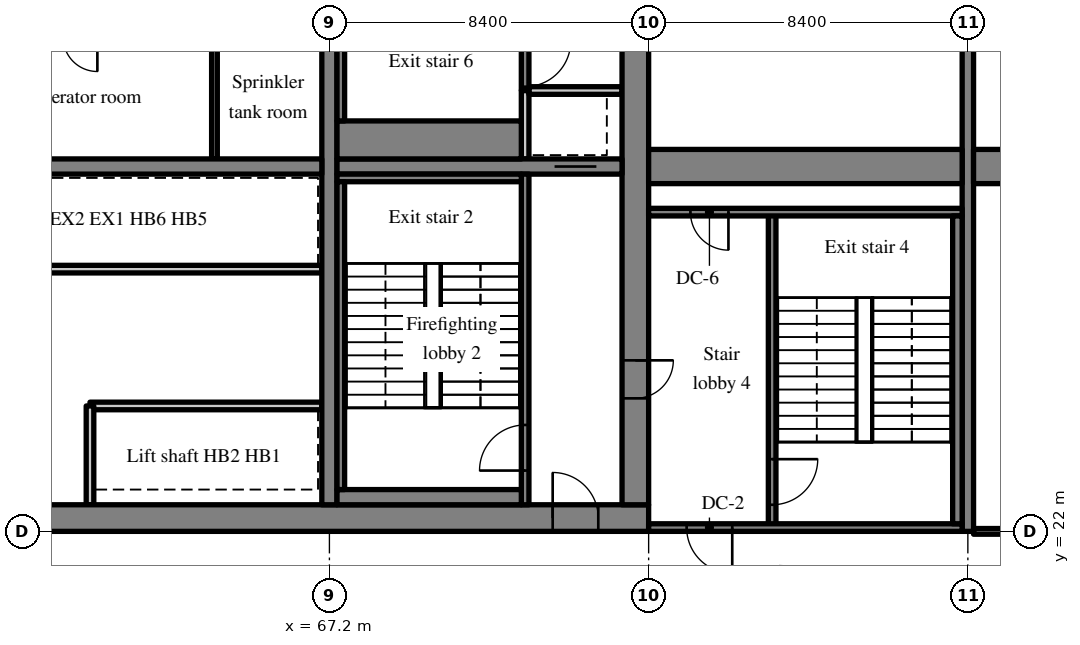
"""IFC4 building model, lengths in metres.
Left out: names, types, materials, properties, quantities, classifications, styles, units other than length and angle.
Written with IfcOpenShell. Run it as: python <this file> out.ifc"""

import sys

from ifc_helpers import new_model, si_unit, direction, frame, frame_2d, origin, place, context, subcontext, project, spatial, rectangle, extrude, source, transform, mapped, element, fill, save


model = new_model("IFC4")
c1 = context("Model", 3, precision=1e-05, world=origin(), true_north=direction((0.0, 1.0)))
c2 = subcontext(c1, "Body", "Model", "MODEL_VIEW")
j1 = project(units=[si_unit("LENGTHUNIT", "METRE"), si_unit("PLANEANGLEUNIT", "RADIAN")], contexts=[c1])
p1 = place(None, origin())
s1 = spatial("IfcSite", under=j1, at=p1, CompositionType="ELEMENT")
p2 = place(p1, origin())
s2 = spatial("IfcBuilding", under=s1, at=p2, CompositionType="ELEMENT")
p3 = place(p2, frame((0.0, 0.0, 201.0)))
s3 = spatial("IfcBuildingStorey", under=s2, at=p3, CompositionType="ELEMENT", Elevation=201.0)
m1 = source(origin(), c2, "Body", "SweptSolid", [
    extrude(rectangle(XDim=50.4, YDim=0.7, at=frame_2d((25.2, 0.0))), origin(), (0.0, 0.0, 1.0), 5.12),
])
p4 = place(p3, frame((25.2, 22.35, 0.0), z_axis=(0.0, 0.0, 1.0), x_axis=(1.0, 0.0, 0.0)))
e1 = element("IfcWall", 1, at=p4, inside=s3, PredefinedType="SHEAR", context=c2, shape_type="MappedRepresentation", body=[
    mapped(m1, transform((0.0, 0.0, 0.0), scale=1.0)),
])
m2 = source(origin(), c2, "Body", "SweptSolid", [
    extrude(rectangle(XDim=1.2, YDim=2.1, at=frame_2d((0.6, 1.05))), frame((0.0, 0.36, 0.0), z_axis=(0.0, -1.0, 0.0), x_axis=(1.0, 0.0, 0.0)), (0.0, 0.0, 1.0), 0.72),
])
p5 = place(p4, frame((22.25, 0.0, 0.0)))
e2 = element("IfcOpeningElement", 2, at=p5, cuts=e1, PredefinedType="OPENING", context=c2, shape_type="MappedRepresentation", body=[
    mapped(m2, transform((0.0, 0.0, 0.0), scale=1.0)),
])
m3 = source(origin(), c2, "Body", "SweptSolid", [
    extrude(rectangle(XDim=0.9, YDim=2.1, at=frame_2d((0.45, 1.05))), frame((0.0, 0.36, 0.0), z_axis=(0.0, -1.0, 0.0), x_axis=(1.0, 0.0, 0.0)), (0.0, 0.0, 1.0), 0.72),
])
p6 = place(p4, frame((15.75, 0.0, 0.0)))
e3 = element("IfcOpeningElement", 3, at=p6, cuts=e1, PredefinedType="OPENING", context=c2, shape_type="MappedRepresentation", body=[
    mapped(m3, transform((0.0, 0.0, 0.0), scale=1.0)),
])
p7 = place(p4, frame((18.75, 0.0, 0.0)))
e4 = element("IfcOpeningElement", 4, at=p7, cuts=e1, PredefinedType="OPENING", context=c2, shape_type="MappedRepresentation", body=[
    mapped(m3, transform((0.0, 0.0, 0.0), scale=1.0)),
])
p8 = place(p4, frame((11.2, 0.0, 0.0)))
e5 = element("IfcOpeningElement", 5, at=p8, cuts=e1, PredefinedType="OPENING", context=c2, shape_type="MappedRepresentation", body=[
    mapped(m3, transform((0.0, 0.0, 0.0), scale=1.0)),
])
m4 = source(origin(), c2, "Body", "SweptSolid", [
    extrude(rectangle(XDim=1.8, YDim=2.1, at=frame_2d((0.9, 1.05))), frame((0.0, 0.36, 0.0), z_axis=(0.0, -1.0, 0.0), x_axis=(1.0, 0.0, 0.0)), (0.0, 0.0, 1.0), 0.72),
])
p9 = place(p4, frame((32.7, 0.0, 0.0)))
e6 = element("IfcOpeningElement", 6, at=p9, cuts=e1, PredefinedType="OPENING", context=c2, shape_type="MappedRepresentation", body=[
    mapped(m4, transform((0.0, 0.0, 0.0), scale=1.0)),
])
p10 = place(p4, frame((6.475, 0.0, 0.0)))
e7 = element("IfcOpeningElement", 7, at=p10, cuts=e1, PredefinedType="OPENING", context=c2, shape_type="MappedRepresentation", body=[
    mapped(m2, transform((0.0, 0.0, 0.0), scale=1.0)),
])
p11 = place(p4, frame((47.875, 0.0, 0.0)))
e8 = element("IfcOpeningElement", 8, at=p11, cuts=e1, PredefinedType="OPENING", context=c2, shape_type="MappedRepresentation", body=[
    mapped(m2, transform((0.0, 0.0, 0.0), scale=1.0)),
])
m5 = source(origin(), c2, "Body", "SweptSolid", [
    extrude(rectangle(XDim=18.6, YDim=0.7, at=frame_2d((9.3, 0.0))), origin(), (0.0, 0.0, 1.0), 5.12),
])
p12 = place(p3, frame((75.25, 22.7, 0.0), z_axis=(0.0, 0.0, 1.0), x_axis=(0.0, 1.0, 0.0)))
e9 = element("IfcWall", 9, at=p12, inside=s3, PredefinedType="SHEAR", context=c2, shape_type="MappedRepresentation", body=[
    mapped(m5, transform((0.0, 0.0, 0.0), scale=1.0)),
])
m6 = source(origin(), c2, "Body", "SweptSolid", [
    extrude(rectangle(XDim=1.0, YDim=2.1, at=frame_2d((0.5, 1.05))), frame((0.0, 0.36, 0.0), z_axis=(0.0, -1.0, 0.0), x_axis=(1.0, 0.0, 0.0)), (0.0, 0.0, 1.0), 0.72),
])
p13 = place(p12, frame((2.8, 0.0, 0.0)))
e10 = element("IfcOpeningElement", 10, at=p13, cuts=e9, PredefinedType="OPENING", context=c2, shape_type="MappedRepresentation", body=[
    mapped(m6, transform((0.0, 0.0, 0.0), scale=1.0)),
])
p14 = place(p12, frame((12.7, 0.0, 0.0)))
e11 = element("IfcOpeningElement", 11, at=p14, cuts=e9, PredefinedType="OPENING", context=c2, shape_type="MappedRepresentation", body=[
    mapped(m2, transform((0.0, 0.0, 0.0), scale=1.0)),
])
m7 = source(origin(), c2, "Body", "SweptSolid", [
    extrude(rectangle(XDim=18.6, YDim=0.4, at=frame_2d((9.3, 0.0))), origin(), (0.0, 0.0, 1.0), 5.12),
])
p15 = place(p3, frame((67.2, 22.7, 0.0), z_axis=(0.0, 0.0, 1.0), x_axis=(0.0, 1.0, 0.0)))
e12 = element("IfcWall", 12, at=p15, inside=s3, PredefinedType="SHEAR", context=c2, shape_type="MappedRepresentation", body=[
    mapped(m7, transform((0.0, 0.0, 0.0), scale=1.0)),
])
m8 = source(origin(), c2, "Body", "SweptSolid", [
    extrude(rectangle(XDim=16.4, YDim=0.4, at=frame_2d((8.2, 0.0))), origin(), (0.0, 0.0, 1.0), 5.12),
])
p16 = place(p3, frame((50.6, 31.6, 0.0), z_axis=(0.0, 0.0, 1.0), x_axis=(1.0, 0.0, 0.0)))
e13 = element("IfcWall", 13, at=p16, inside=s3, PredefinedType="SHEAR", context=c2, shape_type="MappedRepresentation", body=[
    mapped(m8, transform((0.0, 0.0, 0.0), scale=1.0)),
])
m9 = source(origin(), c2, "Body", "SweptSolid", [
    extrude(rectangle(XDim=1.0, YDim=2.1, at=frame_2d((0.5, 1.05))), frame((0.0, 0.21, 0.0), z_axis=(0.0, -1.0, 0.0), x_axis=(1.0, 0.0, 0.0)), (0.0, 0.0, 1.0), 0.42),
])
p17 = place(p16, frame((0.6, 0.0, 0.0)))
e14 = element("IfcOpeningElement", 14, at=p17, cuts=e13, PredefinedType="OPENING", context=c2, shape_type="MappedRepresentation", body=[
    mapped(m9, transform((0.0, 0.0, 0.0), scale=1.0)),
])
m10 = source(origin(), c2, "Body", "SweptSolid", [
    extrude(rectangle(XDim=7.5, YDim=0.4, at=frame_2d((3.75, 0.0))), origin(), (0.0, 0.0, 1.0), 5.12),
])
p18 = place(p3, frame((67.4, 31.6, 0.0), z_axis=(0.0, 0.0, 1.0), x_axis=(1.0, 0.0, 0.0)))
e15 = element("IfcWall", 15, at=p18, inside=s3, PredefinedType="SHEAR", context=c2, shape_type="MappedRepresentation", body=[
    mapped(m10, transform((0.0, 0.0, 0.0), scale=1.0)),
])
m11 = source(origin(), c2, "Body", "SweptSolid", [
    extrude(rectangle(XDim=1.1, YDim=2.1, at=frame_2d((0.55, 1.05))), frame((0.0, 0.21, 0.0), z_axis=(0.0, -1.0, 0.0), x_axis=(1.0, 0.0, 0.0)), (0.0, 0.0, 1.0), 0.42),
])
p19 = place(p18, frame((5.725, 0.0, 0.0)))
e16 = element("IfcOpeningElement", 16, at=p19, cuts=e15, PredefinedType="OPENING", context=c2, shape_type="MappedRepresentation", body=[
    mapped(m11, transform((0.0, 0.0, 0.0), scale=1.0)),
])
m12 = source(origin(), c2, "Body", "SweptSolid", [
    extrude(rectangle(XDim=20.0, YDim=0.3, at=frame_2d((10.0, 0.0))), origin(), (0.0, 0.0, 1.0), 5.12),
])
p20 = place(p3, frame((84.0, 22.0, 0.0), z_axis=(0.0, 0.0, 1.0), x_axis=(0.0, 1.0, 0.0)))
e17 = element("IfcWall", 17, at=p20, inside=s3, PredefinedType="SHEAR", context=c2, shape_type="MappedRepresentation", body=[
    mapped(m12, transform((0.0, 0.0, 0.0), scale=1.0)),
])
m13 = source(origin(), c2, "Body", "SweptSolid", [
    extrude(rectangle(XDim=1.2, YDim=2.1, at=frame_2d((0.6, 1.05))), frame((0.0, 0.16, 0.0), z_axis=(0.0, -1.0, 0.0), x_axis=(1.0, 0.0, 0.0)), (0.0, 0.0, 1.0), 0.32),
])
p21 = place(p20, frame((13.4, 0.0, 0.0)))
e18 = element("IfcOpeningElement", 18, at=p21, cuts=e17, PredefinedType="OPENING", context=c2, shape_type="MappedRepresentation", body=[
    mapped(m13, transform((0.0, 0.0, 0.0), scale=1.0)),
])
m14 = source(origin(), c2, "Body", "SweptSolid", [
    extrude(rectangle(XDim=8.25, YDim=0.9, at=frame_2d((4.125, 0.0))), origin(), (0.0, 0.0, 1.0), 5.12),
])
p22 = place(p3, frame((75.6, 31.6, 0.0), z_axis=(0.0, 0.0, 1.0), x_axis=(1.0, 0.0, 0.0)))
e19 = element("IfcWall", 19, at=p22, inside=s3, PredefinedType="SHEAR", context=c2, shape_type="MappedRepresentation", body=[
    mapped(m14, transform((0.0, 0.0, 0.0), scale=1.0)),
])
m15 = source(origin(), c2, "Body", "SweptSolid", [
    extrude(rectangle(XDim=7.95, YDim=0.9, at=frame_2d((3.975, 0.0))), origin(), (0.0, 0.0, 1.0), 5.12),
])
p23 = place(p3, frame((84.15, 31.6, 0.0), z_axis=(0.0, 0.0, 1.0), x_axis=(1.0, 0.0, 0.0)))
e20 = element("IfcWall", 20, at=p23, inside=s3, PredefinedType="SHEAR", context=c2, shape_type="MappedRepresentation", body=[
    mapped(m15, transform((0.0, 0.0, 0.0), scale=1.0)),
])
m16 = source(origin(), c2, "Body", "SweptSolid", [
    extrude(rectangle(XDim=6.1, YDim=0.2, at=frame_2d((3.05, 0.0))), origin(), (0.0, 0.0, 1.0), 5.12),
])
p24 = place(p3, frame((67.0, 25.3, 0.0), z_axis=(0.0, 0.0, 1.0), x_axis=(-1.0, 0.0, 0.0)))
e21 = element("IfcWall", 21, at=p24, inside=s3, PredefinedType="SOLIDWALL", context=c2, shape_type="MappedRepresentation", body=[
    mapped(m16, transform((0.0, 0.0, 0.0), scale=1.0)),
])
m17 = source(origin(), c2, "Body", "SweptSolid", [
    extrude(rectangle(XDim=12.1, YDim=0.2, at=frame_2d((6.05, 0.0))), origin(), (0.0, 0.0, 1.0), 5.12),
])
p25 = place(p3, frame((67.0, 28.9, 0.0), z_axis=(0.0, 0.0, 1.0), x_axis=(-1.0, 0.0, 0.0)))
e22 = element("IfcWall", 22, at=p25, inside=s3, PredefinedType="SOLIDWALL", context=c2, shape_type="MappedRepresentation", body=[
    mapped(m17, transform((0.0, 0.0, 0.0), scale=1.0)),
])
m18 = source(origin(), c2, "Body", "SweptSolid", [
    extrude(rectangle(XDim=2.6, YDim=0.2, at=frame_2d((1.3, 0.0))), origin(), (0.0, 0.0, 1.0), 5.12),
])
p26 = place(p3, frame((60.9, 22.7, 0.0), z_axis=(0.0, 0.0, 1.0), x_axis=(0.0, 1.0, 0.0)))
e23 = element("IfcWall", 23, at=p26, inside=s3, PredefinedType="SOLIDWALL", context=c2, shape_type="MappedRepresentation", body=[
    mapped(m18, transform((0.0, 0.0, 0.0), scale=1.0)),
])
m19 = source(origin(), c2, "Body", "SweptSolid", [
    extrude(rectangle(XDim=3.2, YDim=0.15, at=frame_2d((1.6, 0.0))), origin(), (0.0, 0.0, 1.0), 5.12),
])
p27 = place(p3, frame((64.175, 31.8, 0.0), z_axis=(0.0, 0.0, 1.0), x_axis=(0.0, 1.0, 0.0)))
e24 = element("IfcWall", 24, at=p27, inside=s3, PredefinedType="PARTITIONING", context=c2, shape_type="MappedRepresentation", body=[
    mapped(m19, transform((0.0, 0.0, 0.0), scale=1.0)),
])
m20 = source(origin(), c2, "Body", "SweptSolid", [
    extrude(rectangle(XDim=8.7, YDim=0.2, at=frame_2d((4.35, 0.0))), origin(), (0.0, 0.0, 1.0), 5.12),
])
p28 = place(p3, frame((72.35, 22.7, 0.0), z_axis=(0.0, 0.0, 1.0), x_axis=(0.0, 1.0, 0.0)))
e25 = element("IfcWall", 25, at=p28, inside=s3, PredefinedType="SOLIDWALL", context=c2, shape_type="MappedRepresentation", body=[
    mapped(m20, transform((0.0, 0.0, 0.0), scale=1.0)),
])
m21 = source(origin(), c2, "Body", "SweptSolid", [
    extrude(rectangle(XDim=1.2, YDim=2.1, at=frame_2d((0.6, 1.05))), frame((0.0, 0.11, 0.0), z_axis=(0.0, -1.0, 0.0), x_axis=(1.0, 0.0, 0.0)), (0.0, 0.0, 1.0), 0.22),
])
p29 = place(p28, frame((0.9, 0.0, 0.0)))
e26 = element("IfcOpeningElement", 26, at=p29, cuts=e25, PredefinedType="OPENING", context=c2, shape_type="MappedRepresentation", body=[
    mapped(m21, transform((0.0, 0.0, 0.0), scale=1.0)),
])
m22 = source(origin(), c2, "Body", "SweptSolid", [
    extrude(rectangle(XDim=1.8, YDim=0.2, at=frame_2d((0.9, 0.0))), origin(), (0.0, 0.0, 1.0), 5.12),
])
p30 = place(p3, frame((72.35, 31.8, 0.0), z_axis=(0.0, 0.0, 1.0), x_axis=(0.0, 1.0, 0.0)))
e27 = element("IfcWall", 27, at=p30, inside=s3, PredefinedType="SOLIDWALL", context=c2, shape_type="MappedRepresentation", body=[
    mapped(m22, transform((0.0, 0.0, 0.0), scale=1.0)),
])
m23 = source(origin(), c2, "Body", "SweptSolid", [
    extrude(rectangle(XDim=2.45, YDim=0.2, at=frame_2d((1.225, 0.0))), origin(), (0.0, 0.0, 1.0), 5.12),
])
p31 = place(p3, frame((72.45, 33.6, 0.0), z_axis=(0.0, 0.0, 1.0), x_axis=(1.0, 0.0, 0.0)))
e28 = element("IfcWall", 28, at=p31, inside=s3, PredefinedType="SOLIDWALL", context=c2, shape_type="MappedRepresentation", body=[
    mapped(m23, transform((0.0, 0.0, 0.0), scale=1.0)),
])
m24 = source(origin(), c2, "Body", "SweptSolid", [
    extrude(rectangle(XDim=7.7, YDim=0.2, at=frame_2d((3.85, 0.0))), origin(), (0.0, 0.0, 1.0), 5.12),
])
p32 = place(p3, frame((72.35, 33.6, 0.0), z_axis=(0.0, 0.0, 1.0), x_axis=(0.0, 1.0, 0.0)))
e29 = element("IfcWall", 29, at=p32, inside=s3, PredefinedType="SOLIDWALL", context=c2, shape_type="MappedRepresentation", body=[
    mapped(m24, transform((0.0, 0.0, 0.0), scale=1.0)),
])
p33 = place(p32, frame((0.1, 0.0, 0.0)))
e30 = element("IfcOpeningElement", 30, at=p33, cuts=e29, PredefinedType="OPENING", context=c2, shape_type="MappedRepresentation", body=[
    mapped(m21, transform((0.0, 0.0, 0.0), scale=1.0)),
])
m25 = source(origin(), c2, "Body", "SweptSolid", [
    extrude(rectangle(XDim=8.3, YDim=0.2, at=frame_2d((4.15, 0.0))), origin(), (0.0, 0.0, 1.0), 5.12),
])
p34 = place(p3, frame((78.85, 22.1, 0.0), z_axis=(0.0, 0.0, 1.0), x_axis=(0.0, 1.0, 0.0)))
e31 = element("IfcWall", 31, at=p34, inside=s3, PredefinedType="SOLIDWALL", context=c2, shape_type="MappedRepresentation", body=[
    mapped(m25, transform((0.0, 0.0, 0.0), scale=1.0)),
])
p35 = place(p34, frame((0.6, 0.0, 0.0)))
e32 = element("IfcOpeningElement", 32, at=p35, cuts=e31, PredefinedType="OPENING", context=c2, shape_type="MappedRepresentation", body=[
    mapped(m21, transform((0.0, 0.0, 0.0), scale=1.0)),
])
m26 = source(origin(), c2, "Body", "SweptSolid", [
    extrude(rectangle(XDim=8.25, YDim=0.2, at=frame_2d((4.125, 0.0))), origin(), (0.0, 0.0, 1.0), 5.12),
])
p36 = place(p3, frame((83.85, 22.1, 0.0), z_axis=(0.0, 0.0, 1.0), x_axis=(-1.0, 0.0, 0.0)))
e33 = element("IfcWall", 33, at=p36, inside=s3, PredefinedType="SOLIDWALL", context=c2, shape_type="MappedRepresentation", body=[
    mapped(m26, transform((0.0, 0.0, 0.0), scale=1.0)),
])
p37 = place(p36, frame((6.05, 0.0, 0.0)))
e34 = element("IfcOpeningElement", 34, at=p37, cuts=e33, PredefinedType="OPENING", context=c2, shape_type="MappedRepresentation", body=[
    mapped(m21, transform((0.0, 0.0, 0.0), scale=1.0)),
])
p38 = place(p3, frame((83.85, 30.4, 0.0), z_axis=(0.0, 0.0, 1.0), x_axis=(-1.0, 0.0, 0.0)))
e35 = element("IfcWall", 35, at=p38, inside=s3, PredefinedType="SOLIDWALL", context=c2, shape_type="MappedRepresentation", body=[
    mapped(m26, transform((0.0, 0.0, 0.0), scale=1.0)),
])
m27 = source(origin(), c2, "Body", "SweptSolid", [
    extrude(rectangle(XDim=1.0, YDim=2.1, at=frame_2d((0.5, 1.05))), frame((0.0, 0.11, 0.0), z_axis=(0.0, -1.0, 0.0), x_axis=(1.0, 0.0, 0.0)), (0.0, 0.0, 1.0), 0.22),
])
p39 = place(p38, frame((6.15, 0.0, 0.0)))
e36 = element("IfcOpeningElement", 36, at=p39, cuts=e35, PredefinedType="OPENING", context=c2, shape_type="MappedRepresentation", body=[
    mapped(m27, transform((0.0, 0.0, 0.0), scale=1.0)),
])
m28 = source(origin(), c2, "Body", "SweptSolid", [
    extrude(rectangle(XDim=4.85, YDim=0.4, at=frame_2d((2.425, 0.0))), origin(), (0.0, 0.0, 1.0), 5.12),
])
p40 = place(p3, frame((67.4, 22.9, 0.0), z_axis=(0.0, 0.0, 1.0), x_axis=(1.0, 0.0, 0.0)))
e37 = element("IfcWall", 37, at=p40, inside=s3, PredefinedType="SOLIDWALL", context=c2, shape_type="MappedRepresentation", body=[
    mapped(m28, transform((0.0, 0.0, 0.0), scale=1.0)),
])
m29 = source(origin(), c2, "Body", "SweptSolid", [
    extrude(rectangle(XDim=4.85, YDim=0.2, at=frame_2d((2.425, 0.0))), origin(), (0.0, 0.0, 1.0), 5.12),
])
p41 = place(p3, frame((67.4, 31.3, 0.0), z_axis=(0.0, 0.0, 1.0), x_axis=(1.0, 0.0, 0.0)))
e38 = element("IfcWall", 38, at=p41, inside=s3, PredefinedType="SOLIDWALL", context=c2, shape_type="MappedRepresentation", body=[
    mapped(m29, transform((0.0, 0.0, 0.0), scale=1.0)),
])
m30 = source(origin(), c2, "Body", "SweptSolid", [
    extrude(rectangle(XDim=8.1, YDim=0.2, at=frame_2d((4.05, 0.0))), origin(), (0.0, 0.0, 1.0), 5.12),
])
p42 = place(p3, frame((67.5, 23.1, 0.0), z_axis=(0.0, 0.0, 1.0), x_axis=(0.0, 1.0, 0.0)))
e39 = element("IfcWall", 39, at=p42, inside=s3, PredefinedType="SOLIDWALL", context=c2, shape_type="MappedRepresentation", body=[
    mapped(m30, transform((0.0, 0.0, 0.0), scale=1.0)),
])
m31 = source(origin(), c2, "Body", "SweptSolid", [
    extrude(rectangle(XDim=4.85, YDim=1.0, at=frame_2d((2.425, 0.0))), origin(), (0.0, 0.0, 1.0), 5.12),
])
p43 = place(p3, frame((67.4, 32.3, 0.0), z_axis=(0.0, 0.0, 1.0), x_axis=(1.0, 0.0, 0.0)))
e40 = element("IfcWall", 40, at=p43, inside=s3, PredefinedType="SOLIDWALL", context=c2, shape_type="MappedRepresentation", body=[
    mapped(m31, transform((0.0, 0.0, 0.0), scale=1.0)),
])
p44 = place(p3, frame((67.5, 32.8, 0.0), z_axis=(0.0, 0.0, 1.0), x_axis=(0.0, 1.0, 0.0)))
e41 = element("IfcWall", 41, at=p44, inside=s3, PredefinedType="SOLIDWALL", context=c2, shape_type="MappedRepresentation", body=[
    mapped(m30, transform((0.0, 0.0, 0.0), scale=1.0)),
])
m32 = source(origin(), c2, "Body", "SweptSolid", [
    extrude(rectangle(XDim=8.1, YDim=0.25, at=frame_2d((4.05, 0.0))), origin(), (0.0, 0.0, 1.0), 5.12),
])
p45 = place(p3, frame((83.725, 22.2, 0.0), z_axis=(0.0, 0.0, 1.0), x_axis=(0.0, 1.0, 0.0)))
e42 = element("IfcWall", 42, at=p45, inside=s3, PredefinedType="SOLIDWALL", context=c2, shape_type="MappedRepresentation", body=[
    mapped(m32, transform((0.0, 0.0, 0.0), scale=1.0)),
])
m33 = source(origin(), c2, "Body", "SweptSolid", [
    extrude(rectangle(XDim=7.95, YDim=0.15, at=frame_2d((3.975, 0.0))), origin(), (0.0, 0.0, 1.0), 4.37),
])
p46 = place(p3, frame((84.15, 22.0, 0.0), z_axis=(0.0, 0.0, 1.0), x_axis=(1.0, 0.0, 0.0)))
e43 = element("IfcWall", 43, at=p46, inside=s3, PredefinedType="PARTITIONING", context=c2, shape_type="MappedRepresentation", body=[
    mapped(m33, transform((0.0, 0.0, 0.0), scale=1.0)),
])
m34 = source(origin(), c2, "Body", "SweptSolid", [
    extrude(rectangle(XDim=1.2, YDim=2.1, at=frame_2d((0.6, 1.05))), frame((0.0, 0.085, 0.0), z_axis=(0.0, -1.0, 0.0), x_axis=(1.0, 0.0, 0.0)), (0.0, 0.0, 1.0), 0.17),
])
p47 = place(p46, frame((3.375, 0.0, 0.0)))
e44 = element("IfcOpeningElement", 44, at=p47, cuts=e43, PredefinedType="OPENING", context=c2, shape_type="MappedRepresentation", body=[
    mapped(m34, transform((0.0, 0.0, 0.0), scale=1.0)),
])
m35 = source(origin(), c2, "Body", "SweptSolid", [
    extrude(rectangle(XDim=1.2, YDim=2.1, at=frame_2d((0.6, 1.05))), frame((0.0, 0.025, 0.0), z_axis=(0.0, -1.0, 0.0), x_axis=(1.0, 0.0, 0.0)), (0.0, 0.0, 1.0), 0.05),
])
p48 = place(p29, origin())
e45 = element("IfcDoor", 45, at=p48, inside=s3, OperationType="SINGLE_SWING_LEFT", PredefinedType="DOOR", context=c2, shape_type="MappedRepresentation", body=[
    mapped(m35, transform((0.0, 0.0, 0.0), scale=1.0)),
])
fill(e26, e45)
m36 = source(origin(), c2, "Body", "SweptSolid", [
    extrude(rectangle(XDim=1.2, YDim=2.1, at=frame_2d((0.6, 1.05))), frame((0.0, 0.275, 0.0), z_axis=(0.0, -1.0, 0.0), x_axis=(1.0, 0.0, 0.0)), (0.0, 0.0, 1.0), 0.05),
])
p49 = place(p11, origin())
e46 = element("IfcDoor", 46, at=p49, inside=s3, OperationType="SINGLE_SWING_LEFT", PredefinedType="DOOR", context=c2, shape_type="MappedRepresentation", body=[
    mapped(m36, transform((0.0, 0.0, 0.0), scale=1.0)),
])
fill(e8, e46)
m37 = source(origin(), c2, "Body", "SweptSolid", [
    extrude(rectangle(XDim=1.1, YDim=2.1, at=frame_2d((0.55, 1.05))), frame((0.0, 0.025, 0.0), z_axis=(0.0, -1.0, 0.0), x_axis=(1.0, 0.0, 0.0)), (0.0, 0.0, 1.0), 0.05),
])
p50 = place(p19, origin())
e47 = element("IfcDoor", 47, at=p50, inside=s3, OperationType="SLIDING_TO_LEFT", PredefinedType="DOOR", context=c2, shape_type="MappedRepresentation", body=[
    mapped(m37, transform((0.0, 0.0, 0.0), scale=1.0)),
])
fill(e16, e47)
m38 = source(origin(), c2, "Body", "SweptSolid", [
    extrude(rectangle(XDim=1.0, YDim=2.1, at=frame_2d((0.5, 1.05))), frame((0.0, 0.025, 0.0), z_axis=(0.0, -1.0, 0.0), x_axis=(1.0, 0.0, 0.0)), (0.0, 0.0, 1.0), 0.05),
])
p51 = place(p13, origin())
e48 = element("IfcDoor", 48, at=p51, inside=s3, OperationType="SINGLE_SWING_RIGHT", PredefinedType="DOOR", context=c2, shape_type="MappedRepresentation", body=[
    mapped(m38, transform((0.0, 0.0, 0.0), scale=1.0)),
])
fill(e10, e48)
p52 = place(p33, origin())
e49 = element("IfcDoor", 49, at=p52, inside=s3, OperationType="SINGLE_SWING_RIGHT", PredefinedType="DOOR", context=c2, shape_type="MappedRepresentation", body=[
    mapped(m35, transform((0.0, 0.0, 0.0), scale=1.0)),
])
fill(e30, e49)
p53 = place(p35, origin())
e50 = element("IfcDoor", 50, at=p53, inside=s3, OperationType="SINGLE_SWING_RIGHT", PredefinedType="DOOR", context=c2, shape_type="MappedRepresentation", body=[
    mapped(m35, transform((0.0, 0.0, 0.0), scale=1.0)),
])
fill(e32, e50)
p54 = place(p37, origin())
e51 = element("IfcDoor", 51, at=p54, inside=s3, OperationType="SINGLE_SWING_LEFT", PredefinedType="DOOR", context=c2, shape_type="MappedRepresentation", body=[
    mapped(m35, transform((0.0, 0.0, 0.0), scale=1.0)),
])
fill(e34, e51)
p55 = place(p39, origin())
e52 = element("IfcDoor", 52, at=p55, inside=s3, OperationType="SINGLE_SWING_LEFT", PredefinedType="DOOR", context=c2, shape_type="MappedRepresentation", body=[
    mapped(m38, transform((0.0, 0.0, 0.0), scale=1.0)),
])
fill(e36, e52)
save(model, sys.argv[1])
